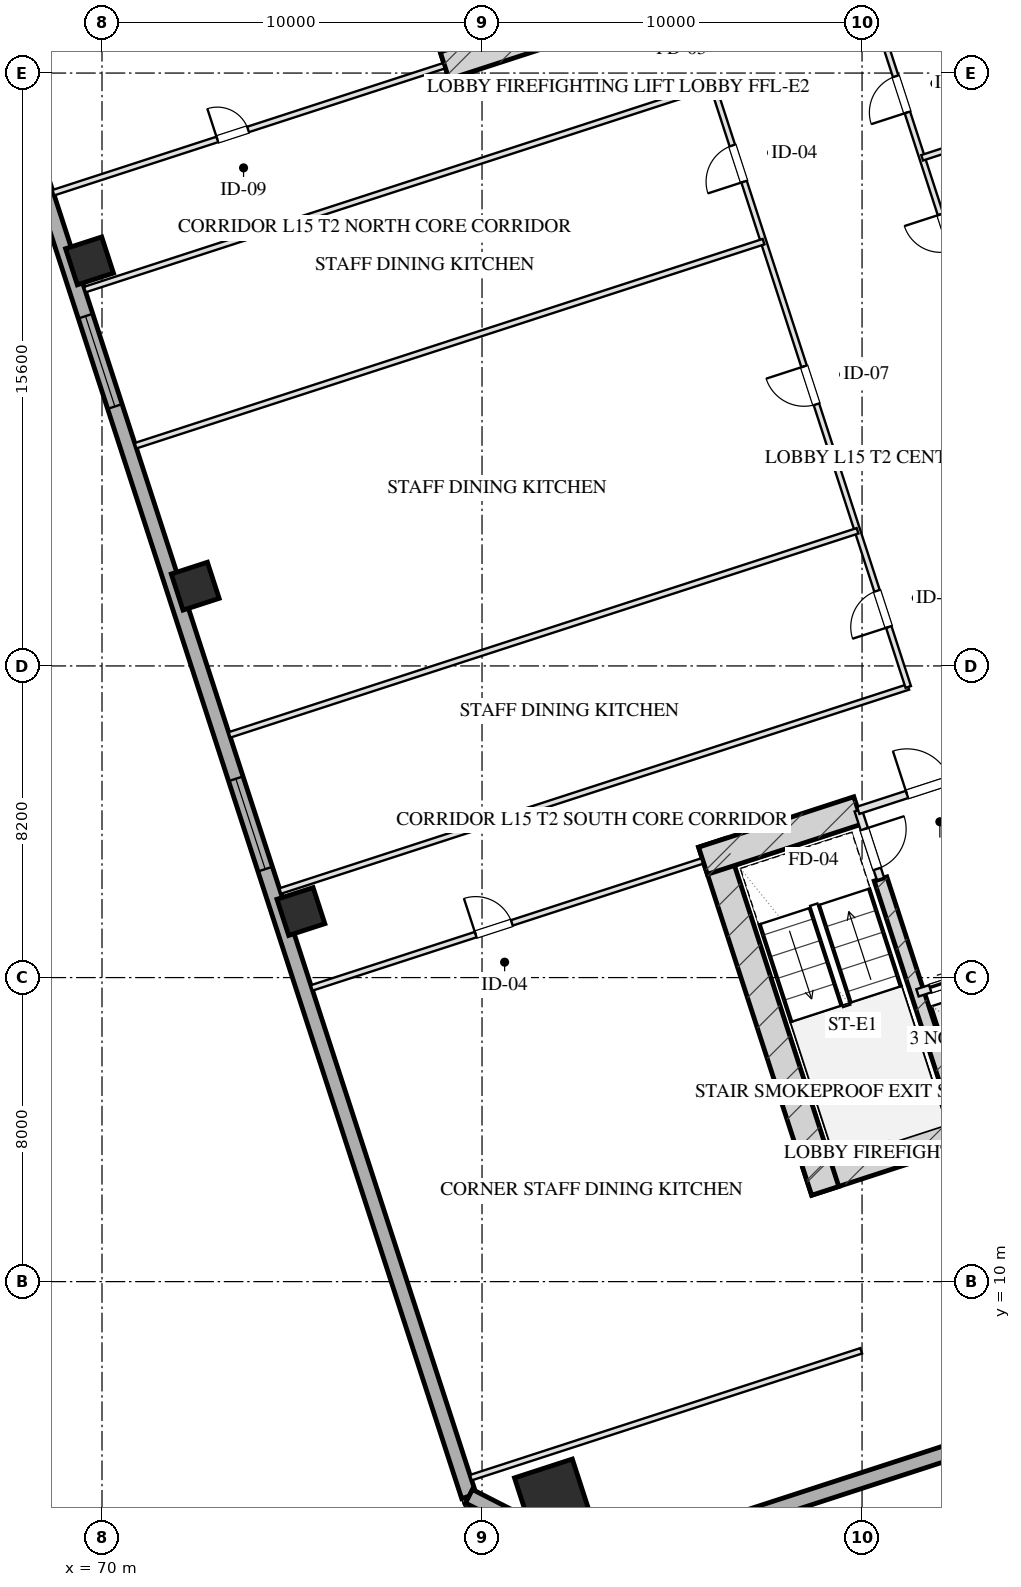
"""IFC4 building model, lengths in metres.
Left out: names, types, materials, properties, quantities, classifications, styles, units other than length and angle.
Written with IfcOpenShell. Run it as: python <this file> out.ifc"""

import sys

from ifc_helpers import new_model, si_unit, direction, frame, frame_2d, origin, origin_2d, place, context, subcontext, project, spatial, rectangle, hollow_rectangle, extrude, element, fill, save


model = new_model("IFC4")
c1 = context("Model", 3, precision=1e-05, world=origin(), true_north=direction((0.0, 1.0)))
c2 = subcontext(c1, "Body", "Model", "MODEL_VIEW")
j1 = project(units=[si_unit("LENGTHUNIT", "METRE"), si_unit("PLANEANGLEUNIT", "RADIAN")], contexts=[c1])
p1 = place(None, origin())
s1 = spatial("IfcSite", under=j1, at=p1, CompositionType="ELEMENT")
p2 = place(p1, origin())
s2 = spatial("IfcBuilding", under=s1, at=p2, CompositionType="ELEMENT")
p3 = place(p2, frame((0.0, 0.0, 64.4)))
s3 = spatial("IfcBuildingStorey", under=s2, at=p3, CompositionType="ELEMENT", Elevation=64.4)
p4 = place(p3, frame((88.559, 12.629, 0.0), z_axis=(0.0, 0.0, 1.0), x_axis=(0.951056072937, 0.309018358888, 0.0)))
e1 = element("IfcWall", 1, at=p4, inside=s3, PredefinedType="SHEAR", context=c2, shape_type="SweptSolid", body=[
    extrude(rectangle(XDim=16.55, YDim=0.75, at=frame_2d((8.275, 0.0))), origin(), (0.0, 0.0, 1.0), 3.45),
])
p5 = place(p3, frame((86.055, 21.546, 0.0), z_axis=(0.0, 0.0, 1.0), x_axis=(0.309023585745, -0.951054374604, 0.0)))
e2 = element("IfcWall", 2, at=p5, inside=s3, PredefinedType="SHEAR", context=c2, shape_type="SweptSolid", body=[
    extrude(rectangle(XDim=9.63, YDim=0.75, at=frame_2d((4.815, 0.0))), origin(), (0.0, 0.0, 1.0), 3.45),
])
p6 = place(p3, frame((90.486, 20.594, 0.0), z_axis=(0.0, 0.0, 1.0), x_axis=(0.309020428229, -0.951055400562, 0.0)))
e3 = element("IfcWall", 3, at=p6, inside=s3, PredefinedType="SHEAR", context=c2, shape_type="SweptSolid", body=[
    extrude(rectangle(XDim=6.98, YDim=0.35, at=frame_2d((3.49, 0.0))), origin(), (0.0, 0.0, 1.0), 3.45),
])
p7 = place(p3, frame((85.814, 21.074, 0.0), z_axis=(0.0, 0.0, 1.0), x_axis=(0.95106580992, 0.308988390074, 0.0)))
e4 = element("IfcWall", 4, at=p7, inside=s3, PredefinedType="SHEAR", context=c2, shape_type="SweptSolid", body=[
    extrude(rectangle(XDim=4.295, YDim=0.75, at=frame_2d((2.147, 0.0))), origin(), (0.0, 0.0, 1.0), 3.45),
])
p8 = place(p3, frame((79.489, 41.756, 0.0), z_axis=(0.0, 0.0, 1.0), x_axis=(-0.309016134813, 0.951056795583, 0.0)))
e5 = element("IfcWall", 5, at=p8, inside=s3, PredefinedType="SHEAR", context=c2, shape_type="SweptSolid", body=[
    extrude(rectangle(XDim=9.63, YDim=0.75, at=frame_2d((4.815, 0.0))), origin(), (0.0, 0.0, 1.0), 3.45),
])
p9 = place(p3, frame((79.016, 41.997, 0.0), z_axis=(0.0, 0.0, 1.0), x_axis=(0.95106038264, 0.309005094736, 0.0)))
e6 = element("IfcWall", 6, at=p9, inside=s3, PredefinedType="SHEAR", context=c2, shape_type="SweptSolid", body=[
    extrude(rectangle(XDim=4.295, YDim=0.75, at=frame_2d((2.147, 0.0))), origin(), (0.0, 0.0, 1.0), 3.45),
])
p10 = place(p3, frame((81.863, 4.323, 0.0), z_axis=(0.0, 0.0, 1.0), x_axis=(0.951056516295, 0.309016994375, 0.0)))
e7 = element("IfcColumn", 7, at=p10, inside=s3, PredefinedType="COLUMN", context=c2, shape_type="SweptSolid", body=[
    extrude(hollow_rectangle(XDim=1.6, YDim=1.6, WallThickness=0.055, at=origin_2d()), origin(), (0.0, 0.0, 1.0), 3.451),
])
for number, where, z_axis, x_axis in (
    (8, (75.234, 19.739, 0.0), (0.0, 0.0, 1.0), (0.951, 0.309, 0.0)),
    (9, (72.453, 28.299, 0.0), (0.0, 0.0, 1.0), (0.951, 0.309, 0.0)),
    (10, (69.672, 36.858, 0.0), (0.0, 0.0, 1.0), (0.951, 0.309, 0.0)),
):
    element("IfcColumn", number, at=place(p3, frame(where, z_axis=z_axis, x_axis=x_axis)), inside=s3, PredefinedType="COLUMN", context=c2, shape_type="SweptSolid", body=[
        extrude(hollow_rectangle(XDim=1.0, YDim=1.0, WallThickness=0.036, at=origin_2d()), origin(), (0.0, 0.0, 1.0), 3.451),
    ])
p11 = place(p3, frame((79.655, 4.352, 0.0), z_axis=(0.0, 0.0, 1.0), x_axis=(-0.309014526607, 0.951057318118, 0.0)))
e11 = element("IfcWall", 11, at=p11, inside=s3, PredefinedType="SOLIDWALL", context=c2, shape_type="SweptSolid", body=[
    extrude(rectangle(XDim=50.0, YDim=0.4, at=frame_2d((25.0, 0.0))), origin(), (0.0, 0.0, 1.0), 2.61),
])
p12 = place(p11, frame((17.35, 0.0, 0.75)))
e12 = element("IfcOpeningElement", 12, at=p12, cuts=e11, PredefinedType="OPENING", context=c2, shape_type="SweptSolid", body=[
    extrude(rectangle(XDim=2.5, YDim=1.46, at=frame_2d((1.25, 0.73))), frame((0.0, 0.21, 0.0), z_axis=(0.0, -1.0, 0.0), x_axis=(1.0, 0.0, 0.0)), (0.0, 0.0, 1.0), 0.42),
])
p13 = place(p11, frame((30.15, 0.0, 0.75)))
e13 = element("IfcOpeningElement", 13, at=p13, cuts=e11, PredefinedType="OPENING", context=c2, shape_type="SweptSolid", body=[
    extrude(rectangle(XDim=2.5, YDim=1.46, at=frame_2d((1.25, 0.73))), frame((0.0, 0.21, 0.0), z_axis=(0.0, -1.0, 0.0), x_axis=(1.0, 0.0, 0.0)), (0.0, 0.0, 1.0), 0.42),
])
p14 = place(p3, frame((113.998, 12.567, 0.0), z_axis=(0.0, 0.0, 1.0), x_axis=(-0.951055939317, -0.309018770125, 0.0)))
e14 = element("IfcWall", 14, at=p14, inside=s3, PredefinedType="SOLIDWALL", context=c2, shape_type="SweptSolid", body=[
    extrude(rectangle(XDim=32.4, YDim=0.4, at=frame_2d((16.2, 0.0))), origin(), (0.0, 0.0, 1.0), 2.61),
])
p15 = place(p3, frame((83.184, 2.554, 0.0), z_axis=(0.0, 0.0, 1.0), x_axis=(-0.890998089617, 0.454007053137, 0.0)))
e15 = element("IfcWall", 15, at=p15, inside=s3, PredefinedType="SOLIDWALL", context=c2, shape_type="SweptSolid", body=[
    extrude(rectangle(XDim=3.96, YDim=0.4, at=frame_2d((1.98, 0.0))), origin(), (0.0, 0.0, 1.0), 2.61),
])
p16 = place(p3, frame((89.899, 22.401, 0.0), z_axis=(0.0, 0.0, 1.0), x_axis=(0.308932062672, -0.951084108086, 0.0)))
e16 = element("IfcWall", 16, at=p16, inside=s3, PredefinedType="PARTITIONING", context=c2, shape_type="SweptSolid", body=[
    extrude(rectangle(XDim=1.9, YDim=0.2, at=frame_2d((0.95, 0.0))), origin(), (0.0, 0.0, 1.0), 3.175),
])
p17 = place(p16, frame((0.52, 0.0, 0.0)))
e17 = element("IfcOpeningElement", 17, at=p17, cuts=e16, PredefinedType="OPENING", context=c2, shape_type="SweptSolid", body=[
    extrude(rectangle(XDim=1.1, YDim=2.05, at=frame_2d((0.55, 1.025))), frame((0.0, 0.11, 0.0), z_axis=(0.0, -1.0, 0.0), x_axis=(1.0, 0.0, 0.0)), (0.0, 0.0, 1.0), 0.22),
])
p18 = place(p3, frame((89.899, 22.401, 0.0), z_axis=(0.0, 0.0, 1.0), x_axis=(0.951046716504, 0.309047153403, 0.0)))
e18 = element("IfcWall", 18, at=p18, inside=s3, PredefinedType="PARTITIONING", context=c2, shape_type="SweptSolid", body=[
    extrude(rectangle(XDim=3.83, YDim=0.2, at=frame_2d((1.915, 0.0))), origin(), (0.0, 0.0, 1.0), 3.175),
])
p19 = place(p18, frame((1.35, 0.0, 0.0)))
e19 = element("IfcOpeningElement", 19, at=p19, cuts=e18, PredefinedType="OPENING", context=c2, shape_type="SweptSolid", body=[
    extrude(rectangle(XDim=1.2, YDim=2.05, at=frame_2d((0.6, 1.025))), frame((0.0, 0.11, 0.0), z_axis=(0.0, -1.0, 0.0), x_axis=(1.0, 0.0, 0.0)), (0.0, 0.0, 1.0), 0.22),
])
p20 = place(p3, frame((91.46, 17.598, 0.0), z_axis=(0.0, 0.0, 1.0), x_axis=(0.951062257173, 0.308999325213, 0.0)))
e20 = element("IfcWall", 20, at=p20, inside=s3, PredefinedType="PARTITIONING", context=c2, shape_type="SweptSolid", body=[
    extrude(rectangle(XDim=2.1, YDim=0.2, at=frame_2d((1.05, 0.0))), origin(), (0.0, 0.0, 1.0), 3.175),
])
p21 = place(p20, frame((0.35, 0.0, 0.0)))
e21 = element("IfcOpeningElement", 21, at=p21, cuts=e20, PredefinedType="OPENING", context=c2, shape_type="SweptSolid", body=[
    extrude(rectangle(XDim=1.1, YDim=2.05, at=frame_2d((0.55, 1.025))), frame((0.0, 0.11, 0.0), z_axis=(0.0, -1.0, 0.0), x_axis=(1.0, 0.0, 0.0)), (0.0, 0.0, 1.0), 0.22),
])
p22 = place(p3, frame((79.707, 4.842, 0.0), z_axis=(0.0, 0.0, 1.0), x_axis=(0.951056658866, 0.309016555588, 0.0)))
e22 = element("IfcWall", 22, at=p22, inside=s3, PredefinedType="PARTITIONING", context=c2, shape_type="SweptSolid", body=[
    extrude(rectangle(XDim=10.8, YDim=0.15, at=frame_2d((5.4, 0.0))), origin(), (0.0, 0.0, 1.0), 3.175),
])
p23 = place(p3, frame((75.519, 17.729, 0.0), z_axis=(0.0, 0.0, 1.0), x_axis=(0.951056658866, 0.309016555588, 0.0)))
e23 = element("IfcWall", 23, at=p23, inside=s3, PredefinedType="PARTITIONING", context=c2, shape_type="SweptSolid", body=[
    extrude(rectangle(XDim=10.8, YDim=0.15, at=frame_2d((5.4, 0.0))), origin(), (0.0, 0.0, 1.0), 3.175),
])
p24 = place(p23, frame((4.536, 0.0, 0.0)))
e24 = element("IfcOpeningElement", 24, at=p24, cuts=e23, PredefinedType="OPENING", context=c2, shape_type="SweptSolid", body=[
    extrude(rectangle(XDim=1.0, YDim=2.05, at=frame_2d((0.5, 1.025))), frame((0.0, 0.085, 0.0), z_axis=(0.0, -1.0, 0.0), x_axis=(1.0, 0.0, 0.0)), (0.0, 0.0, 1.0), 0.17),
])
p25 = place(p3, frame((68.721, 38.652, 0.0), z_axis=(0.0, 0.0, 1.0), x_axis=(0.951056658866, 0.309016555588, 0.0)))
e25 = element("IfcWall", 25, at=p25, inside=s3, PredefinedType="PARTITIONING", context=c2, shape_type="SweptSolid", body=[
    extrude(rectangle(XDim=10.8, YDim=0.15, at=frame_2d((5.4, 0.0))), origin(), (0.0, 0.0, 1.0), 3.175),
])
p26 = place(p25, frame((4.536, 0.0, 0.0)))
e26 = element("IfcOpeningElement", 26, at=p26, cuts=e25, PredefinedType="OPENING", context=c2, shape_type="SweptSolid", body=[
    extrude(rectangle(XDim=0.85, YDim=2.05, at=frame_2d((0.425, 1.025))), frame((0.0, 0.085, 0.0), z_axis=(0.0, -1.0, 0.0), x_axis=(1.0, 0.0, 0.0)), (0.0, 0.0, 1.0), 0.17),
])
for number, where, z_axis, x_axis in (
    (27, (74.691, 20.278, 0.0), (0.0, 0.0, 1.0), (0.951, 0.309, 0.0)),
    (28, (69.549, 36.103, 0.0), (0.0, 0.0, 1.0), (0.951, 0.309, 0.0)),
):
    element("IfcWall", number, at=place(p3, frame(where, z_axis=z_axis, x_axis=x_axis)), inside=s3, PredefinedType="PARTITIONING", context=c2, shape_type="SweptSolid", body=[
        extrude(rectangle(XDim=17.375, YDim=0.15, at=frame_2d((8.688, 0.0))), origin(), (0.0, 0.0, 1.0), 3.175),
    ])
p27 = place(p3, frame((91.216, 25.647, 0.0), z_axis=(0.0, 0.0, 1.0), x_axis=(-0.309022042254, 0.951054876125, 0.0)))
e29 = element("IfcWall", 29, at=p27, inside=s3, PredefinedType="PARTITIONING", context=c2, shape_type="SweptSolid", body=[
    extrude(rectangle(XDim=16.64, YDim=0.15, at=frame_2d((8.32, 0.0))), origin(), (0.0, 0.0, 1.0), 3.175),
])
p28 = place(p27, frame((1.66, 0.0, 0.0)))
e30 = element("IfcOpeningElement", 30, at=p28, cuts=e29, PredefinedType="OPENING", context=c2, shape_type="SweptSolid", body=[
    extrude(rectangle(XDim=1.0, YDim=2.05, at=frame_2d((0.5, 1.025))), frame((0.0, 0.085, 0.0), z_axis=(0.0, -1.0, 0.0), x_axis=(1.0, 0.0, 0.0)), (0.0, 0.0, 1.0), 0.17),
])
p29 = place(p27, frame((7.82, 0.0, 0.0)))
e31 = element("IfcOpeningElement", 31, at=p29, cuts=e29, PredefinedType="OPENING", context=c2, shape_type="SweptSolid", body=[
    extrude(rectangle(XDim=1.05, YDim=2.05, at=frame_2d((0.525, 1.025))), frame((0.0, 0.085, 0.0), z_axis=(0.0, -1.0, 0.0), x_axis=(1.0, 0.0, 0.0)), (0.0, 0.0, 1.0), 0.17),
])
p30 = place(p27, frame((13.98, 0.0, 0.0)))
e32 = element("IfcOpeningElement", 32, at=p30, cuts=e29, PredefinedType="OPENING", context=c2, shape_type="SweptSolid", body=[
    extrude(rectangle(XDim=1.0, YDim=2.05, at=frame_2d((0.5, 1.025))), frame((0.0, 0.085, 0.0), z_axis=(0.0, -1.0, 0.0), x_axis=(1.0, 0.0, 0.0)), (0.0, 0.0, 1.0), 0.17),
])
p31 = place(p3, frame((95.638, 27.084, 0.0), z_axis=(0.0, 0.0, 1.0), x_axis=(-0.30901773025, 0.951056277195, 0.0)))
e33 = element("IfcWall", 33, at=p31, inside=s3, PredefinedType="PARTITIONING", context=c2, shape_type="SweptSolid", body=[
    extrude(rectangle(XDim=16.64, YDim=0.15, at=frame_2d((8.32, 0.0))), origin(), (0.0, 0.0, 1.0), 3.175),
])
p32 = place(p31, frame((1.655, 0.0, 0.0)))
e34 = element("IfcOpeningElement", 34, at=p32, cuts=e33, PredefinedType="OPENING", context=c2, shape_type="SweptSolid", body=[
    extrude(rectangle(XDim=1.0, YDim=2.05, at=frame_2d((0.5, 1.025))), frame((0.0, 0.085, 0.0), z_axis=(0.0, -1.0, 0.0), x_axis=(1.0, 0.0, 0.0)), (0.0, 0.0, 1.0), 0.17),
])
p33 = place(p31, frame((6.155, 0.0, 0.0)))
e35 = element("IfcOpeningElement", 35, at=p33, cuts=e33, PredefinedType="OPENING", context=c2, shape_type="SweptSolid", body=[
    extrude(rectangle(XDim=1.0, YDim=2.05, at=frame_2d((0.5, 1.025))), frame((0.0, 0.085, 0.0), z_axis=(0.0, -1.0, 0.0), x_axis=(1.0, 0.0, 0.0)), (0.0, 0.0, 1.0), 0.17),
])
p34 = place(p31, frame((10.565, 0.0, 0.0)))
e36 = element("IfcOpeningElement", 36, at=p34, cuts=e33, PredefinedType="OPENING", context=c2, shape_type="SweptSolid", body=[
    extrude(rectangle(XDim=1.0, YDim=2.05, at=frame_2d((0.5, 1.025))), frame((0.0, 0.085, 0.0), z_axis=(0.0, -1.0, 0.0), x_axis=(1.0, 0.0, 0.0)), (0.0, 0.0, 1.0), 0.17),
])
p35 = place(p31, frame((14.385, 0.0, 0.0)))
e37 = element("IfcOpeningElement", 37, at=p35, cuts=e33, PredefinedType="OPENING", context=c2, shape_type="SweptSolid", body=[
    extrude(rectangle(XDim=1.0, YDim=2.05, at=frame_2d((0.5, 1.025))), frame((0.0, 0.085, 0.0), z_axis=(0.0, -1.0, 0.0), x_axis=(1.0, 0.0, 0.0)), (0.0, 0.0, 1.0), 0.17),
])
for number, where, z_axis, x_axis in (
    (38, (73.356, 24.386, 0.0), (0.0, 0.0, 1.0), (0.951, 0.309, 0.0)),
    (39, (70.884, 31.995, 0.0), (0.0, 0.0, 1.0), (0.951, 0.309, 0.0)),
):
    element("IfcWall", number, at=place(p3, frame(where, z_axis=z_axis, x_axis=x_axis)), inside=s3, PredefinedType="PARTITIONING", context=c2, shape_type="SweptSolid", body=[
        extrude(rectangle(XDim=17.375, YDim=0.15, at=frame_2d((8.688, 0.0))), origin(), (0.0, 0.0, 1.0), 3.175),
    ])
p36 = place(p3, frame((91.581, 39.57, 0.0), z_axis=(0.0, 0.0, 1.0), x_axis=(0.951055837847, 0.309019082414, 0.0)))
e40 = element("IfcWall", 40, at=p36, inside=s3, PredefinedType="PARTITIONING", context=c2, shape_type="SweptSolid", body=[
    extrude(rectangle(XDim=15.575, YDim=0.15, at=frame_2d((7.788, 0.0))), origin(), (0.0, 0.0, 1.0), 3.175),
])
p37 = place(p12, origin())
e41 = element("IfcWindow", 41, at=p37, inside=s3, PartitioningType="TRIPLE_PANEL_VERTICAL", PredefinedType="WINDOW", context=c2, shape_type="SweptSolid", body=[
    extrude(rectangle(XDim=2.5, YDim=1.46, at=frame_2d((1.25, 0.73))), frame((0.0, 0.03, 0.0), z_axis=(0.0, -1.0, 0.0), x_axis=(1.0, 0.0, 0.0)), (0.0, 0.0, 1.0), 0.06),
])
fill(e12, e41)
p38 = place(p13, origin())
e42 = element("IfcWindow", 42, at=p38, inside=s3, PartitioningType="TRIPLE_PANEL_VERTICAL", PredefinedType="WINDOW", context=c2, shape_type="SweptSolid", body=[
    extrude(rectangle(XDim=2.5, YDim=1.46, at=frame_2d((1.25, 0.73))), frame((0.0, 0.03, 0.0), z_axis=(0.0, -1.0, 0.0), x_axis=(1.0, 0.0, 0.0)), (0.0, 0.0, 1.0), 0.06),
])
fill(e13, e42)
p39 = place(p17, origin())
e43 = element("IfcDoor", 43, at=p39, inside=s3, OperationType="SINGLE_SWING_LEFT", PredefinedType="DOOR", context=c2, shape_type="SweptSolid", body=[
    extrude(rectangle(XDim=1.1, YDim=2.05, at=frame_2d((0.55, 1.025))), frame((0.0, 0.025, 0.0), z_axis=(0.0, -1.0, 0.0), x_axis=(1.0, 0.0, 0.0)), (0.0, 0.0, 1.0), 0.05),
])
fill(e17, e43)
p40 = place(p19, origin())
e44 = element("IfcDoor", 44, at=p40, inside=s3, OperationType="SINGLE_SWING_LEFT", PredefinedType="DOOR", context=c2, shape_type="SweptSolid", body=[
    extrude(rectangle(XDim=1.2, YDim=2.05, at=frame_2d((0.6, 1.025))), frame((0.0, 0.025, 0.0), z_axis=(0.0, -1.0, 0.0), x_axis=(1.0, 0.0, 0.0)), (0.0, 0.0, 1.0), 0.05),
])
fill(e19, e44)
p41 = place(p21, origin())
e45 = element("IfcDoor", 45, at=p41, inside=s3, OperationType="DOUBLE_DOOR_SLIDING", PredefinedType="DOOR", context=c2, shape_type="SweptSolid", body=[
    extrude(rectangle(XDim=1.1, YDim=2.05, at=frame_2d((0.55, 1.025))), frame((0.0, 0.025, 0.0), z_axis=(0.0, -1.0, 0.0), x_axis=(1.0, 0.0, 0.0)), (0.0, 0.0, 1.0), 0.05),
])
fill(e21, e45)
p42 = place(p24, origin())
e46 = element("IfcDoor", 46, at=p42, inside=s3, OperationType="SINGLE_SWING_LEFT", PredefinedType="DOOR", context=c2, shape_type="SweptSolid", body=[
    extrude(rectangle(XDim=1.0, YDim=2.05, at=frame_2d((0.5, 1.025))), frame((0.0, 0.025, 0.0), z_axis=(0.0, -1.0, 0.0), x_axis=(1.0, 0.0, 0.0)), (0.0, 0.0, 1.0), 0.05),
])
fill(e24, e46)
p43 = place(p26, origin())
e47 = element("IfcDoor", 47, at=p43, inside=s3, OperationType="SINGLE_SWING_LEFT", PredefinedType="DOOR", context=c2, shape_type="SweptSolid", body=[
    extrude(rectangle(XDim=0.85, YDim=2.05, at=frame_2d((0.425, 1.025))), frame((0.0, 0.025, 0.0), z_axis=(0.0, -1.0, 0.0), x_axis=(1.0, 0.0, 0.0)), (0.0, 0.0, 1.0), 0.05),
])
fill(e26, e47)
p44 = place(p28, origin())
e48 = element("IfcDoor", 48, at=p44, inside=s3, OperationType="SINGLE_SWING_LEFT", PredefinedType="DOOR", context=c2, shape_type="SweptSolid", body=[
    extrude(rectangle(XDim=1.0, YDim=2.05, at=frame_2d((0.5, 1.025))), frame((0.0, 0.025, 0.0), z_axis=(0.0, -1.0, 0.0), x_axis=(1.0, 0.0, 0.0)), (0.0, 0.0, 1.0), 0.05),
])
fill(e30, e48)
p45 = place(p29, origin())
e49 = element("IfcDoor", 49, at=p45, inside=s3, OperationType="SINGLE_SWING_RIGHT", PredefinedType="DOOR", context=c2, shape_type="SweptSolid", body=[
    extrude(rectangle(XDim=1.05, YDim=2.05, at=frame_2d((0.525, 1.025))), frame((0.0, 0.025, 0.0), z_axis=(0.0, -1.0, 0.0), x_axis=(1.0, 0.0, 0.0)), (0.0, 0.0, 1.0), 0.05),
])
fill(e31, e49)
p46 = place(p30, origin())
e50 = element("IfcDoor", 50, at=p46, inside=s3, OperationType="SINGLE_SWING_LEFT", PredefinedType="DOOR", context=c2, shape_type="SweptSolid", body=[
    extrude(rectangle(XDim=1.0, YDim=2.05, at=frame_2d((0.5, 1.025))), frame((0.0, 0.025, 0.0), z_axis=(0.0, -1.0, 0.0), x_axis=(1.0, 0.0, 0.0)), (0.0, 0.0, 1.0), 0.05),
])
fill(e32, e50)
p47 = place(p34, origin())
e51 = element("IfcDoor", 51, at=p47, inside=s3, OperationType="SINGLE_SWING_RIGHT", PredefinedType="DOOR", context=c2, shape_type="SweptSolid", body=[
    extrude(rectangle(XDim=1.0, YDim=2.05, at=frame_2d((0.5, 1.025))), frame((0.0, 0.025, 0.0), z_axis=(0.0, -1.0, 0.0), x_axis=(1.0, 0.0, 0.0)), (0.0, 0.0, 1.0), 0.05),
])
fill(e36, e51)
p48 = place(p35, origin())
e52 = element("IfcDoor", 52, at=p48, inside=s3, OperationType="SINGLE_SWING_LEFT", PredefinedType="DOOR", context=c2, shape_type="SweptSolid", body=[
    extrude(rectangle(XDim=1.0, YDim=2.05, at=frame_2d((0.5, 1.025))), frame((0.0, 0.025, 0.0), z_axis=(0.0, -1.0, 0.0), x_axis=(1.0, 0.0, 0.0)), (0.0, 0.0, 1.0), 0.05),
])
fill(e37, e52)
save(model, sys.argv[1])
